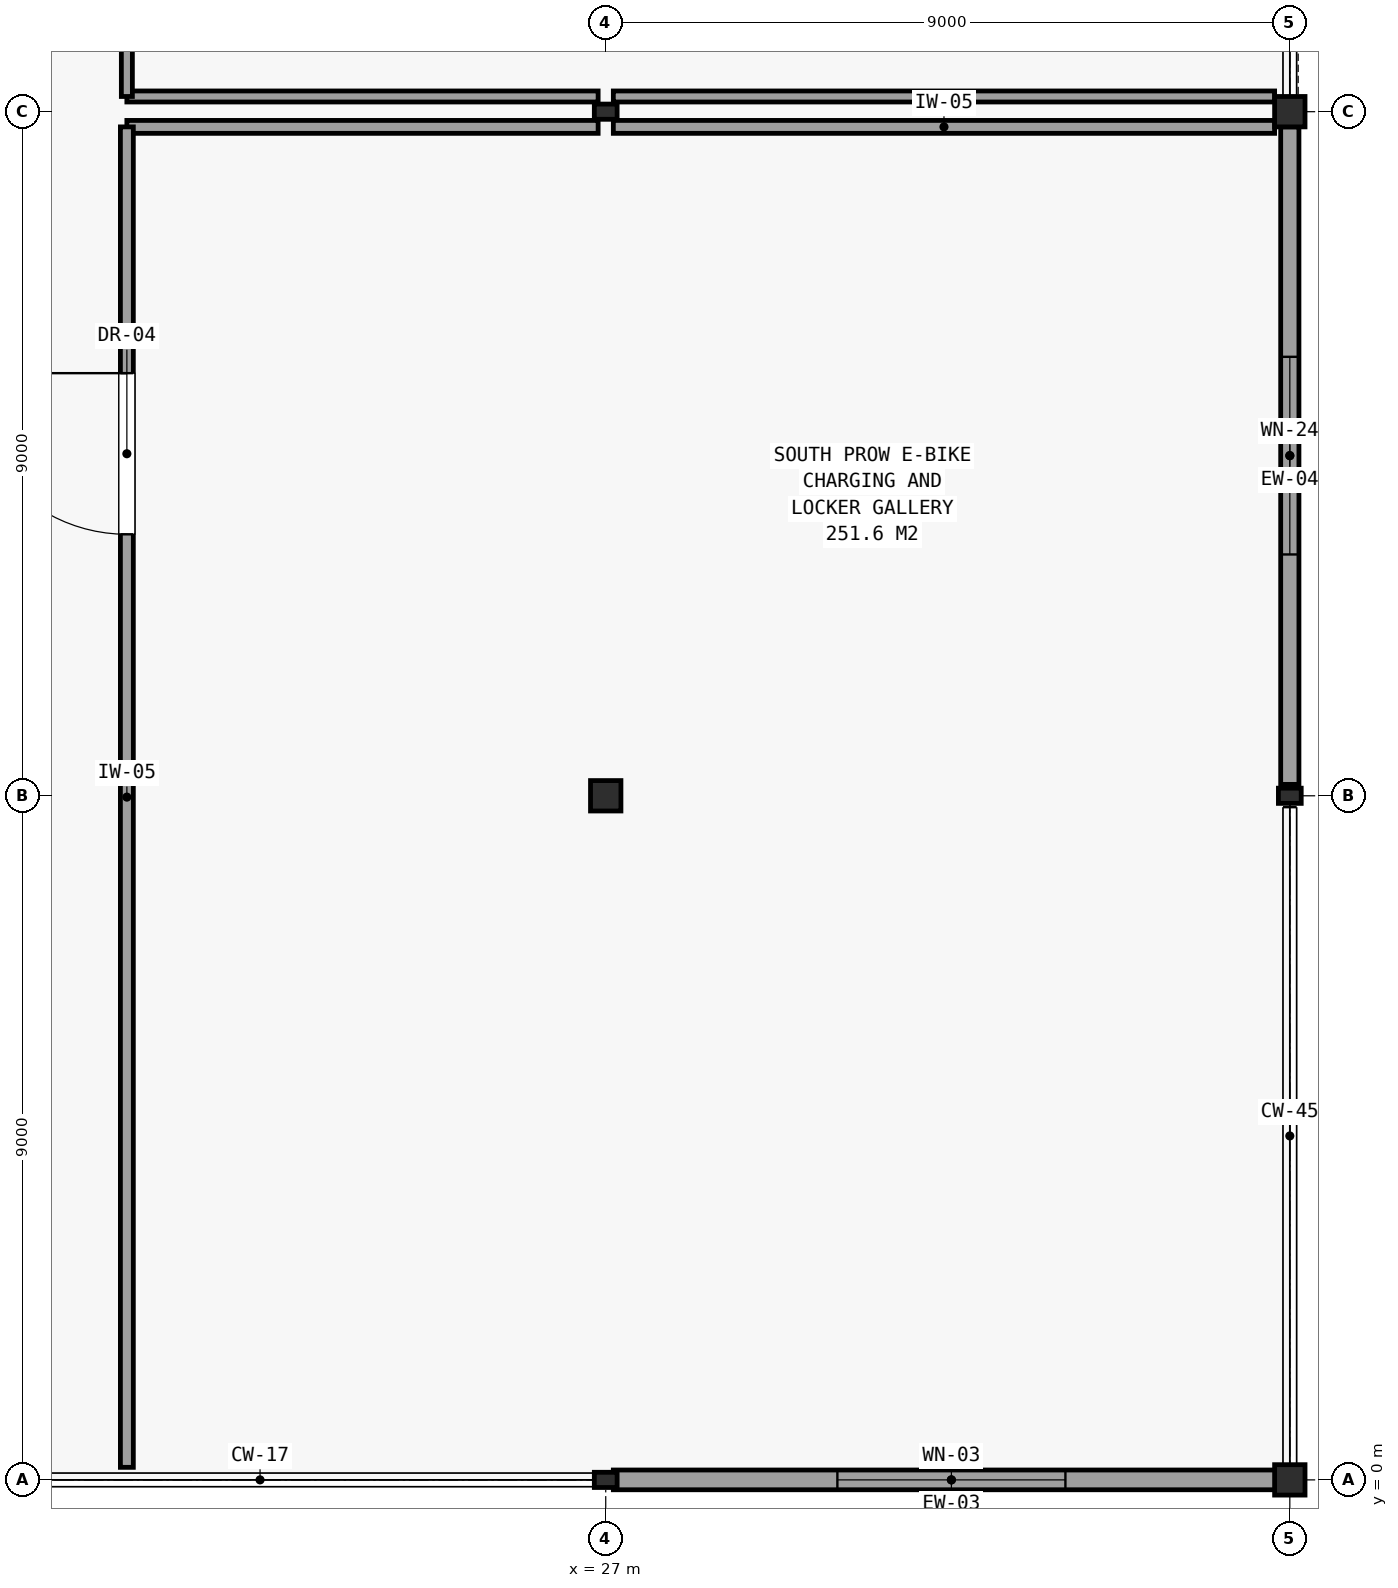
"""IFC4 building model, lengths in metres.
Left out: names, types, materials, properties, quantities, classifications, styles, units other than length and angle.
Written with IfcOpenShell. Run it as: python <this file> out.ifc"""

import sys

from ifc_helpers import new_model, si_unit, direction, frame, frame_2d, origin, origin_2d, place, context, subcontext, project, spatial, rectangle, hollow_rectangle, i_section, extrude, element, fill, save


model = new_model("IFC4")
c1 = context("Model", 3, precision=1e-05, world=origin(), true_north=direction((0.0, 1.0)))
c2 = subcontext(c1, "Body", "Model", "MODEL_VIEW")
j1 = project(units=[si_unit("LENGTHUNIT", "METRE"), si_unit("PLANEANGLEUNIT", "RADIAN")], contexts=[c1])
p1 = place(None, origin())
s1 = spatial("IfcSite", under=j1, at=p1, CompositionType="ELEMENT")
p2 = place(p1, origin())
s2 = spatial("IfcBuilding", under=s1, at=p2, CompositionType="ELEMENT")
p3 = place(p2, frame((0.0, 0.0, 5.1)))
s3 = spatial("IfcBuildingStorey", under=s2, at=p3, CompositionType="ELEMENT", Elevation=5.1)
p4 = place(p3, frame((27.0, 0.0, 0.0), z_axis=(0.0, 0.0, 1.0), x_axis=(1.0, 0.0, 0.0)))
e1 = element("IfcColumn", 1, at=p4, inside=s3, PredefinedType="COLUMN", context=c2, shape_type="SweptSolid", body=[
    extrude(hollow_rectangle(XDim=0.2, YDim=0.3, WallThickness=0.012, at=origin_2d()), origin(), (0.0, 0.0, 1.0), 4.14),
])
p5 = place(p3, frame((27.0, 9.0, 0.0), z_axis=(0.0, 0.0, 1.0), x_axis=(1.0, 0.0, 0.0)))
e2 = element("IfcColumn", 2, at=p5, inside=s3, PredefinedType="COLUMN", context=c2, shape_type="SweptSolid", body=[
    extrude(i_section(OverallWidth=0.4, OverallDepth=0.4, WebThickness=0.013, FlangeThickness=0.021, FilletRadius=0.016, at=origin_2d()), origin(), (0.0, 0.0, 1.0), 4.2),
])
p6 = place(p3, frame((27.0, 18.0, 0.0), z_axis=(0.0, 0.0, 1.0), x_axis=(1.0, 0.0, 0.0)))
e3 = element("IfcColumn", 3, at=p6, inside=s3, PredefinedType="COLUMN", context=c2, shape_type="SweptSolid", body=[
    extrude(hollow_rectangle(XDim=0.2, YDim=0.3, WallThickness=0.012, at=origin_2d()), origin(), (0.0, 0.0, 1.0), 4.2),
])
p7 = place(p3, frame((36.0, 0.0, 0.0), z_axis=(0.0, 0.0, 1.0), x_axis=(1.0, 0.0, 0.0)))
e4 = element("IfcColumn", 4, at=p7, inside=s3, PredefinedType="COLUMN", context=c2, shape_type="SweptSolid", body=[
    extrude(i_section(OverallWidth=0.4, OverallDepth=0.4, WebThickness=0.013, FlangeThickness=0.021, FilletRadius=0.016, at=origin_2d()), origin(), (0.0, 0.0, 1.0), 4.14),
])
p8 = place(p3, frame((36.0, 9.0, 0.0), z_axis=(0.0, 0.0, 1.0), x_axis=(1.0, 0.0, 0.0)))
e5 = element("IfcColumn", 5, at=p8, inside=s3, PredefinedType="COLUMN", context=c2, shape_type="SweptSolid", body=[
    extrude(hollow_rectangle(XDim=0.2, YDim=0.3, WallThickness=0.012, at=origin_2d()), origin(), (0.0, 0.0, 1.0), 4.2),
])
p9 = place(p3, frame((36.0, 18.0, 0.0), z_axis=(0.0, 0.0, 1.0), x_axis=(1.0, 0.0, 0.0)))
e6 = element("IfcColumn", 6, at=p9, inside=s3, PredefinedType="COLUMN", context=c2, shape_type="SweptSolid", body=[
    extrude(i_section(OverallWidth=0.4, OverallDepth=0.4, WebThickness=0.013, FlangeThickness=0.021, FilletRadius=0.016, at=origin_2d()), origin(), (0.0, 0.0, 1.0), 4.2),
])
p10 = place(p3, frame((27.1, 0.0, 0.0), z_axis=(0.0, 0.0, 1.0), x_axis=(1.0, 0.0, 0.0)))
e7 = element("IfcWall", 7, at=p10, inside=s3, PredefinedType="SOLIDWALL", context=c2, shape_type="SweptSolid", body=[
    extrude(rectangle(XDim=8.896, YDim=0.26, at=frame_2d((4.448, 0.0))), origin(), (0.0, 0.0, 1.0), 3.452),
])
p11 = place(p10, frame((2.948, 0.0, 0.95)))
e8 = element("IfcOpeningElement", 8, at=p11, cuts=e7, PredefinedType="OPENING", context=c2, shape_type="SweptSolid", body=[
    extrude(rectangle(XDim=3.0, YDim=2.0, at=frame_2d((1.5, 1.0))), frame((0.0, 0.141, 0.0), z_axis=(0.0, -1.0, 0.0), x_axis=(1.0, 0.0, 0.0)), (0.0, 0.0, 1.0), 0.282),
])
p12 = place(p3, frame((36.0, 9.15, 0.0), z_axis=(0.0, 0.0, 1.0), x_axis=(0.0, 1.0, 0.0)))
e9 = element("IfcWall", 9, at=p12, inside=s3, PredefinedType="SOLIDWALL", context=c2, shape_type="SweptSolid", body=[
    extrude(rectangle(XDim=8.65, YDim=0.24, at=frame_2d((4.325, 0.0))), origin(), (0.0, 0.0, 1.0), 3.352),
])
p13 = place(p12, frame((3.025, 0.0, 0.95)))
e10 = element("IfcOpeningElement", 10, at=p13, cuts=e9, PredefinedType="OPENING", context=c2, shape_type="SweptSolid", body=[
    extrude(rectangle(XDim=2.6, YDim=1.9, at=frame_2d((1.3, 0.95))), frame((0.0, 0.131, 0.0), z_axis=(0.0, -1.0, 0.0), x_axis=(1.0, 0.0, 0.0)), (0.0, 0.0, 1.0), 0.262),
])
p14 = place(p3, frame((20.7, 17.8, 0.0), z_axis=(0.0, 0.0, 1.0), x_axis=(1.0, 0.0, 0.0)))
e11 = element("IfcWall", 11, at=p14, inside=s3, PredefinedType="PARTITIONING", context=c2, shape_type="SweptSolid", body=[
    extrude(rectangle(XDim=6.2, YDim=0.17, at=frame_2d((3.1, 0.0))), origin(), (0.0, 0.0, 1.0), 3.372),
])
p15 = place(p3, frame((27.1, 17.8, 0.0), z_axis=(0.0, 0.0, 1.0), x_axis=(1.0, 0.0, 0.0)))
e12 = element("IfcWall", 12, at=p15, inside=s3, PredefinedType="PARTITIONING", context=c2, shape_type="SweptSolid", body=[
    extrude(rectangle(XDim=8.7, YDim=0.17, at=frame_2d((4.35, 0.0))), origin(), (0.0, 0.0, 1.0), 3.372),
])
p16 = place(p3, frame((20.7, 0.165, 0.0), z_axis=(0.0, 0.0, 1.0), x_axis=(0.0, 1.0, 0.0)))
e13 = element("IfcWall", 13, at=p16, inside=s3, PredefinedType="PARTITIONING", context=c2, shape_type="SweptSolid", body=[
    extrude(rectangle(XDim=17.635, YDim=0.17, at=frame_2d((8.817, 0.0))), origin(), (0.0, 0.0, 1.0), 3.352),
])
p17 = place(p16, frame((12.275, 0.0, 0.0)))
e14 = element("IfcOpeningElement", 14, at=p17, cuts=e13, PredefinedType="OPENING", context=c2, shape_type="SweptSolid", body=[
    extrude(rectangle(XDim=2.12, YDim=2.5, at=frame_2d((1.06, 1.25))), frame((0.0, 0.096, 0.0), z_axis=(0.0, -1.0, 0.0), x_axis=(1.0, 0.0, 0.0)), (0.0, 0.0, 1.0), 0.192),
])
p18 = place(p3, frame((20.7, 18.2, 0.0), z_axis=(0.0, 0.0, 1.0), x_axis=(1.0, 0.0, 0.0)))
e15 = element("IfcWall", 15, at=p18, inside=s3, PredefinedType="PARTITIONING", context=c2, shape_type="SweptSolid", body=[
    extrude(rectangle(XDim=6.2, YDim=0.145, at=frame_2d((3.1, 0.0))), origin(), (0.0, 0.0, 1.0), 3.372),
])
p19 = place(p3, frame((27.1, 18.2, 0.0), z_axis=(0.0, 0.0, 1.0), x_axis=(1.0, 0.0, 0.0)))
e16 = element("IfcWall", 16, at=p19, inside=s3, PredefinedType="PARTITIONING", context=c2, shape_type="SweptSolid", body=[
    extrude(rectangle(XDim=8.7, YDim=0.145, at=frame_2d((4.35, 0.0))), origin(), (0.0, 0.0, 1.0), 3.372),
])
p20 = place(p3, frame((20.7, 18.2, 0.0), z_axis=(0.0, 0.0, 1.0), x_axis=(0.0, 1.0, 0.0)))
e17 = element("IfcWall", 17, at=p20, inside=s3, PredefinedType="PARTITIONING", context=c2, shape_type="SweptSolid", body=[
    extrude(rectangle(XDim=25.6, YDim=0.145, at=frame_2d((12.8, 0.0))), origin(), (0.0, 0.0, 1.0), 3.372),
])
p21 = place(p20, frame((12.18, 0.0, 0.0)))
e18 = element("IfcOpeningElement", 18, at=p21, cuts=e17, PredefinedType="OPENING", context=c2, shape_type="SweptSolid", body=[
    extrude(rectangle(XDim=2.24, YDim=2.733, at=frame_2d((1.12, 1.366))), frame((0.0, 0.083, 0.0), z_axis=(0.0, -1.0, 0.0), x_axis=(1.0, 0.0, 0.0)), (0.0, 0.0, 1.0), 0.167),
])
p22 = place(p11, origin())
e19 = element("IfcWindow", 19, at=p22, inside=s3, PartitioningType="SINGLE_PANEL", PredefinedType="WINDOW", context=c2, shape_type="SweptSolid", body=[
    extrude(rectangle(XDim=3.0, YDim=2.0, at=frame_2d((1.5, 1.0))), frame((0.0, 0.03, 0.0), z_axis=(0.0, -1.0, 0.0), x_axis=(1.0, 0.0, 0.0)), (0.0, 0.0, 1.0), 0.06),
])
fill(e8, e19)
p23 = place(p13, origin())
e20 = element("IfcWindow", 20, at=p23, inside=s3, PartitioningType="SINGLE_PANEL", PredefinedType="WINDOW", context=c2, shape_type="SweptSolid", body=[
    extrude(rectangle(XDim=2.6, YDim=1.9, at=frame_2d((1.3, 0.95))), frame((0.0, 0.03, 0.0), z_axis=(0.0, -1.0, 0.0), x_axis=(1.0, 0.0, 0.0)), (0.0, 0.0, 1.0), 0.06),
])
fill(e10, e20)
p24 = place(p17, origin())
e21 = element("IfcDoor", 21, at=p24, inside=s3, OperationType="SINGLE_SWING_RIGHT", PredefinedType="DOOR", context=c2, shape_type="SweptSolid", body=[
    extrude(rectangle(XDim=2.12, YDim=2.5, at=frame_2d((1.06, 1.25))), frame((0.0, 0.025, 0.0), z_axis=(0.0, -1.0, 0.0), x_axis=(1.0, 0.0, 0.0)), (0.0, 0.0, 1.0), 0.05),
])
fill(e14, e21)
save(model, sys.argv[1])
